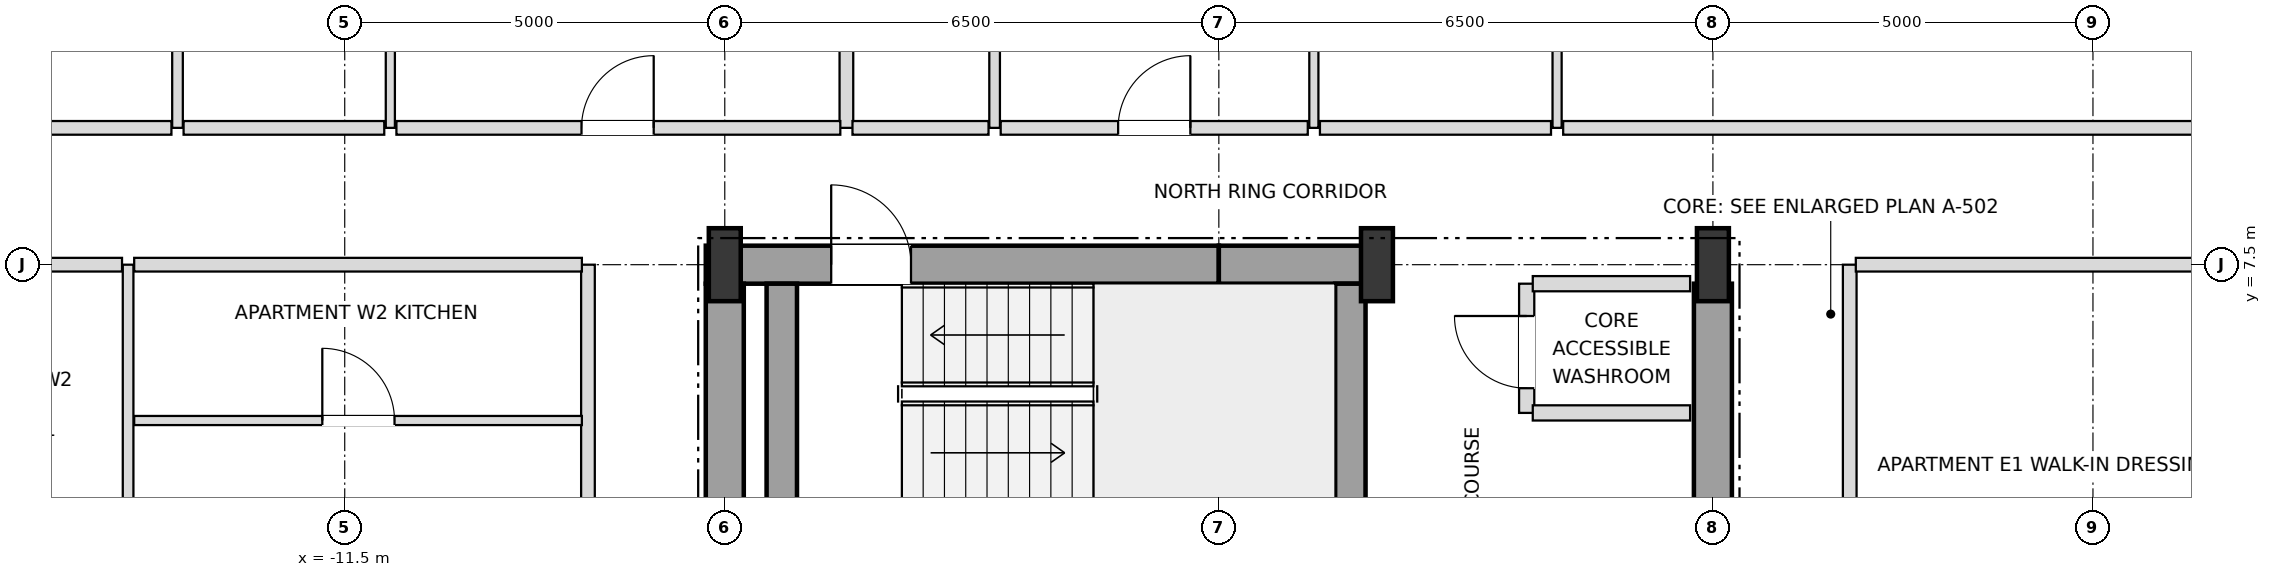
"""IFC4 building model, lengths in metres.
Left out: names, types, materials, properties, quantities, classifications, styles, units other than length and angle.
Written with IfcOpenShell. Run it as: python <this file> out.ifc"""

import sys

from ifc_helpers import new_model, si_unit, direction, frame, frame_2d, origin, origin_2d, place, context, subcontext, project, spatial, rectangle, i_section, extrude, element, fill, save


model = new_model("IFC4")
c1 = context("Model", 3, precision=1e-05, world=origin(), true_north=direction((0.0, 1.0)))
c2 = subcontext(c1, "Body", "Model", "MODEL_VIEW")
j1 = project(units=[si_unit("LENGTHUNIT", "METRE"), si_unit("PLANEANGLEUNIT", "RADIAN")], contexts=[c1])
p1 = place(None, origin())
s1 = spatial("IfcSite", under=j1, at=p1, CompositionType="ELEMENT")
p2 = place(p1, origin())
s2 = spatial("IfcBuilding", under=s1, at=p2, CompositionType="ELEMENT")
p3 = place(p2, frame((0.0, 0.0, 117.0)))
s3 = spatial("IfcBuildingStorey", under=s2, at=p3, CompositionType="ELEMENT", Elevation=117.0)
for number, where, z_axis, x_axis in (
    (1, (-6.5, 7.5, 0.0), (0.0, 0.0, 1.0), (1.0, 0.0, 0.0)),
    (2, (2.08, 7.5, 0.0), (0.0, 0.0, 1.0), (1.0, 0.0, 0.0)),
    (3, (6.5, 7.5, 0.0), (0.0, 0.0, 1.0), (1.0, 0.0, 0.0)),
):
    element("IfcColumn", number, at=place(p3, frame(where, z_axis=z_axis, x_axis=x_axis)), inside=s3, PredefinedType="COLUMN", context=c2, shape_type="SweptSolid", body=[
        extrude(i_section(OverallWidth=0.42, OverallDepth=0.96, WebThickness=0.022, FlangeThickness=0.034, at=origin_2d()), origin(), (0.0, 0.0, 1.0), 3.6),
    ])
p4 = place(p3, frame((-6.75, 7.5, 0.0), z_axis=(0.0, 0.0, 1.0), x_axis=(1.0, 0.0, 0.0)))
e4 = element("IfcWall", 4, at=p4, inside=s3, PredefinedType="SHEAR", context=c2, shape_type="SweptSolid", body=[
    extrude(rectangle(XDim=6.75, YDim=0.5, at=frame_2d((3.375, 0.0))), origin(), (0.0, 0.0, 1.0), 3.3),
])
p5 = place(p4, frame((1.65, 0.0, 0.0)))
e5 = element("IfcOpeningElement", 5, at=p5, cuts=e4, PredefinedType="OPENING", context=c2, shape_type="SweptSolid", body=[
    extrude(rectangle(XDim=1.05, YDim=2.15, at=frame_2d((0.525, 1.075))), frame((0.0, 0.26, 0.0), z_axis=(0.0, -1.0, 0.0), x_axis=(1.0, 0.0, 0.0)), (0.0, 0.0, 1.0), 0.52),
])
p6 = place(p3, frame((0.0, 7.5, 0.0), z_axis=(0.0, 0.0, 1.0), x_axis=(1.0, 0.0, 0.0)))
e6 = element("IfcWall", 6, at=p6, inside=s3, PredefinedType="SHEAR", context=c2, shape_type="SweptSolid", body=[
    extrude(rectangle(XDim=2.08, YDim=0.5, at=frame_2d((1.04, 0.0))), origin(), (0.0, 0.0, 1.0), 3.3),
])
for number, where, z_axis, x_axis in (
    (7, (-6.5, 3.95, 0.0), (0.0, 0.0, 1.0), (0.0, 1.0, 0.0)),
    (8, (6.5, 3.95, 0.0), (0.0, 0.0, 1.0), (0.0, 1.0, 0.0)),
):
    element("IfcWall", number, at=place(p3, frame(where, z_axis=z_axis, x_axis=x_axis)), inside=s3, PredefinedType="SHEAR", context=c2, shape_type="SweptSolid", body=[
        extrude(rectangle(XDim=3.3, YDim=0.5, at=frame_2d((1.65, 0.0))), origin(), (0.0, 0.0, 1.0), 3.3),
    ])
for number, where, z_axis, x_axis in (
    (9, (1.73, 3.95, 0.0), (0.0, 0.0, 1.0), (0.0, 1.0, 0.0)),
    (10, (-5.75, 3.95, 0.0), (0.0, 0.0, 1.0), (0.0, 1.0, 0.0)),
):
    element("IfcWall", number, at=place(p3, frame(where, z_axis=z_axis, x_axis=x_axis)), inside=s3, PredefinedType="SHEAR", context=c2, shape_type="SweptSolid", body=[
        extrude(rectangle(XDim=3.3, YDim=0.4, at=frame_2d((1.65, 0.0))), origin(), (0.0, 0.0, 1.0), 3.3),
    ])
p7 = place(p3, frame((-14.35, -7.5, 0.0), z_axis=(0.0, 0.0, 1.0), x_axis=(0.0, 1.0, 0.0)))
e11 = element("IfcWall", 11, at=p7, inside=s3, PredefinedType="PARTITIONING", context=c2, shape_type="SweptSolid", body=[
    extrude(rectangle(XDim=15.0, YDim=0.14, at=frame_2d((7.5, 0.0))), origin(), (0.0, 0.0, 1.0), 3.3),
])
p8 = place(p7, frame((2.305, 0.0, 0.0)))
e12 = element("IfcOpeningElement", 12, at=p8, cuts=e11, PredefinedType="OPENING", context=c2, shape_type="SweptSolid", body=[
    extrude(rectangle(XDim=0.95, YDim=2.1, at=frame_2d((0.475, 1.05))), frame((0.0, 0.08, 0.0), z_axis=(0.0, -1.0, 0.0), x_axis=(1.0, 0.0, 0.0)), (0.0, 0.0, 1.0), 0.16),
])
p9 = place(p7, frame((9.795, 0.0, 0.0)))
e13 = element("IfcOpeningElement", 13, at=p9, cuts=e11, PredefinedType="OPENING", context=c2, shape_type="SweptSolid", body=[
    extrude(rectangle(XDim=0.95, YDim=2.1, at=frame_2d((0.475, 1.05))), frame((0.0, 0.08, 0.0), z_axis=(0.0, -1.0, 0.0), x_axis=(1.0, 0.0, 0.0)), (0.0, 0.0, 1.0), 0.16),
])
p10 = place(p3, frame((-13.7, 9.3, 0.0), z_axis=(0.0, 0.0, 1.0), x_axis=(0.0, 1.0, 0.0)))
e14 = element("IfcWall", 14, at=p10, inside=s3, PredefinedType="PARTITIONING", context=c2, shape_type="SweptSolid", body=[
    extrude(rectangle(XDim=7.85, YDim=0.14, at=frame_2d((3.925, 0.0))), origin(), (0.0, 0.0, 1.0), 2.656),
])
p11 = place(p10, frame((3.47, 0.0, 0.0)))
e15 = element("IfcOpeningElement", 15, at=p11, cuts=e14, PredefinedType="OPENING", context=c2, shape_type="SweptSolid", body=[
    extrude(rectangle(XDim=0.9, YDim=2.1, at=frame_2d((0.45, 1.05))), frame((0.0, 0.08, 0.0), z_axis=(0.0, -1.0, 0.0), x_axis=(1.0, 0.0, 0.0)), (0.0, 0.0, 1.0), 0.16),
])
p12 = place(p3, frame((-10.9, 9.3, 0.0), z_axis=(0.0, 0.0, 1.0), x_axis=(0.0, 1.0, 0.0)))
e16 = element("IfcWall", 16, at=p12, inside=s3, PredefinedType="PARTITIONING", context=c2, shape_type="SweptSolid", body=[
    extrude(rectangle(XDim=13.85, YDim=0.12, at=frame_2d((6.925, 0.0))), origin(), (0.0, 0.0, 1.0), 2.736),
])
p13 = place(p12, frame((4.219, 0.0, 0.0)))
e17 = element("IfcOpeningElement", 17, at=p13, cuts=e16, PredefinedType="OPENING", context=c2, shape_type="SweptSolid", body=[
    extrude(rectangle(XDim=0.95, YDim=2.1, at=frame_2d((0.475, 1.05))), frame((0.0, 0.07, 0.0), z_axis=(0.0, -1.0, 0.0), x_axis=(1.0, 0.0, 0.0)), (0.0, 0.0, 1.0), 0.14),
])
p14 = place(p12, frame((11.551, 0.0, 0.0)))
e18 = element("IfcOpeningElement", 18, at=p14, cuts=e16, PredefinedType="OPENING", context=c2, shape_type="SweptSolid", body=[
    extrude(rectangle(XDim=0.9, YDim=2.1, at=frame_2d((0.45, 1.05))), frame((0.0, 0.07, 0.0), z_axis=(0.0, -1.0, 0.0), x_axis=(1.0, 0.0, 0.0)), (0.0, 0.0, 1.0), 0.14),
])
p15 = place(p3, frame((-8.3, -7.5, 0.0), z_axis=(0.0, 0.0, 1.0), x_axis=(0.0, 1.0, 0.0)))
e19 = element("IfcWall", 19, at=p15, inside=s3, PredefinedType="PARTITIONING", context=c2, shape_type="SweptSolid", body=[
    extrude(rectangle(XDim=15.0, YDim=0.18, at=frame_2d((7.5, 0.0))), origin(), (0.0, 0.0, 1.0), 3.3),
])
p16 = place(p15, frame((3.145, 0.0, 0.0)))
e20 = element("IfcOpeningElement", 20, at=p16, cuts=e19, PredefinedType="OPENING", context=c2, shape_type="SweptSolid", body=[
    extrude(rectangle(XDim=0.95, YDim=2.15, at=frame_2d((0.475, 1.075))), frame((0.0, 0.1, 0.0), z_axis=(0.0, -1.0, 0.0), x_axis=(1.0, 0.0, 0.0)), (0.0, 0.0, 1.0), 0.2),
])
p17 = place(p15, frame((10.645, 0.0, 0.0)))
e21 = element("IfcOpeningElement", 21, at=p17, cuts=e19, PredefinedType="OPENING", context=c2, shape_type="SweptSolid", body=[
    extrude(rectangle(XDim=0.95, YDim=2.15, at=frame_2d((0.475, 1.075))), frame((0.0, 0.1, 0.0), z_axis=(0.0, -1.0, 0.0), x_axis=(1.0, 0.0, 0.0)), (0.0, 0.0, 1.0), 0.2),
])
p18 = place(p3, frame((-4.9, 9.3, 0.0), z_axis=(0.0, 0.0, 1.0), x_axis=(0.0, 1.0, 0.0)))
e22 = element("IfcWall", 22, at=p18, inside=s3, PredefinedType="PARTITIONING", context=c2, shape_type="SweptSolid", body=[
    extrude(rectangle(XDim=13.85, YDim=0.18, at=frame_2d((6.925, 0.0))), origin(), (0.0, 0.0, 1.0), 2.736),
])
p19 = place(p3, frame((-2.95, 9.3, 0.0), z_axis=(0.0, 0.0, 1.0), x_axis=(0.0, 1.0, 0.0)))
e23 = element("IfcWall", 23, at=p19, inside=s3, PredefinedType="PARTITIONING", context=c2, shape_type="SweptSolid", body=[
    extrude(rectangle(XDim=7.85, YDim=0.14, at=frame_2d((3.925, 0.0))), origin(), (0.0, 0.0, 1.0), 3.3),
])
p20 = place(p19, frame((3.47, 0.0, 0.0)))
e24 = element("IfcOpeningElement", 24, at=p20, cuts=e23, PredefinedType="OPENING", context=c2, shape_type="SweptSolid", body=[
    extrude(rectangle(XDim=0.9, YDim=2.1, at=frame_2d((0.45, 1.05))), frame((0.0, 0.08, 0.0), z_axis=(0.0, -1.0, 0.0), x_axis=(1.0, 0.0, 0.0)), (0.0, 0.0, 1.0), 0.16),
])
p21 = place(p3, frame((1.25, 9.3, 0.0), z_axis=(0.0, 0.0, 1.0), x_axis=(0.0, 1.0, 0.0)))
e25 = element("IfcWall", 25, at=p21, inside=s3, PredefinedType="PARTITIONING", context=c2, shape_type="SweptSolid", body=[
    extrude(rectangle(XDim=7.85, YDim=0.12, at=frame_2d((3.925, 0.0))), origin(), (0.0, 0.0, 1.0), 3.3),
])
p22 = place(p21, frame((3.445, 0.0, 0.0)))
e26 = element("IfcOpeningElement", 26, at=p22, cuts=e25, PredefinedType="OPENING", context=c2, shape_type="SweptSolid", body=[
    extrude(rectangle(XDim=0.95, YDim=2.1, at=frame_2d((0.475, 1.05))), frame((0.0, 0.07, 0.0), z_axis=(0.0, -1.0, 0.0), x_axis=(1.0, 0.0, 0.0)), (0.0, 0.0, 1.0), 0.14),
])
p23 = place(p3, frame((4.05, 5.55, 0.0), z_axis=(0.0, 0.0, 1.0), x_axis=(0.0, 1.0, 0.0)))
e27 = element("IfcWall", 27, at=p23, inside=s3, PredefinedType="SOLIDWALL", context=c2, shape_type="SweptSolid", body=[
    extrude(rectangle(XDim=1.7, YDim=0.2, at=frame_2d((0.85, 0.0))), origin(), (0.0, 0.0, 1.0), 3.3),
])
p24 = place(p23, frame((0.325, 0.0, 0.0)))
e28 = element("IfcOpeningElement", 28, at=p24, cuts=e27, PredefinedType="OPENING", context=c2, shape_type="SweptSolid", body=[
    extrude(rectangle(XDim=0.95, YDim=2.15, at=frame_2d((0.475, 1.075))), frame((0.0, 0.11, 0.0), z_axis=(0.0, -1.0, 0.0), x_axis=(1.0, 0.0, 0.0)), (0.0, 0.0, 1.0), 0.22),
])
p25 = place(p3, frame((4.45, 9.3, 0.0), z_axis=(0.0, 0.0, 1.0), x_axis=(0.0, 1.0, 0.0)))
e29 = element("IfcWall", 29, at=p25, inside=s3, PredefinedType="PARTITIONING", context=c2, shape_type="SweptSolid", body=[
    extrude(rectangle(XDim=13.85, YDim=0.12, at=frame_2d((6.925, 0.0))), origin(), (0.0, 0.0, 1.0), 2.736),
])
p26 = place(p25, frame((3.445, 0.0, 0.0)))
e30 = element("IfcOpeningElement", 30, at=p26, cuts=e29, PredefinedType="OPENING", context=c2, shape_type="SweptSolid", body=[
    extrude(rectangle(XDim=0.95, YDim=2.1, at=frame_2d((0.475, 1.05))), frame((0.0, 0.07, 0.0), z_axis=(0.0, -1.0, 0.0), x_axis=(1.0, 0.0, 0.0)), (0.0, 0.0, 1.0), 0.14),
])
p27 = place(p25, frame((10.4, 0.0, 0.0)))
e31 = element("IfcOpeningElement", 31, at=p27, cuts=e29, PredefinedType="OPENING", context=c2, shape_type="SweptSolid", body=[
    extrude(rectangle(XDim=0.9, YDim=2.1, at=frame_2d((0.45, 1.05))), frame((0.0, 0.07, 0.0), z_axis=(0.0, -1.0, 0.0), x_axis=(1.0, 0.0, 0.0)), (0.0, 0.0, 1.0), 0.14),
])
p28 = place(p3, frame((8.3, -7.5, 0.0), z_axis=(0.0, 0.0, 1.0), x_axis=(0.0, 1.0, 0.0)))
e32 = element("IfcWall", 32, at=p28, inside=s3, PredefinedType="PARTITIONING", context=c2, shape_type="SweptSolid", body=[
    extrude(rectangle(XDim=15.0, YDim=0.18, at=frame_2d((7.5, 0.0))), origin(), (0.0, 0.0, 1.0), 3.3),
])
p29 = place(p28, frame((3.475, 0.0, 0.0)))
e33 = element("IfcOpeningElement", 33, at=p29, cuts=e32, PredefinedType="OPENING", context=c2, shape_type="SweptSolid", body=[
    extrude(rectangle(XDim=0.95, YDim=2.15, at=frame_2d((0.475, 1.075))), frame((0.0, 0.1, 0.0), z_axis=(0.0, -1.0, 0.0), x_axis=(1.0, 0.0, 0.0)), (0.0, 0.0, 1.0), 0.2),
])
p30 = place(p3, frame((-14.27, 5.45, 0.0), z_axis=(0.0, 0.0, 1.0), x_axis=(1.0, 0.0, 0.0)))
e34 = element("IfcWall", 34, at=p30, inside=s3, PredefinedType="PARTITIONING", context=c2, shape_type="SweptSolid", body=[
    extrude(rectangle(XDim=5.89, YDim=0.12, at=frame_2d((2.945, 0.0))), origin(), (0.0, 0.0, 1.0), 3.3),
])
p31 = place(p30, frame((2.475, 0.0, 0.0)))
e35 = element("IfcOpeningElement", 35, at=p31, cuts=e34, PredefinedType="OPENING", context=c2, shape_type="SweptSolid", body=[
    extrude(rectangle(XDim=0.95, YDim=2.1, at=frame_2d((0.475, 1.05))), frame((0.0, 0.07, 0.0), z_axis=(0.0, -1.0, 0.0), x_axis=(1.0, 0.0, 0.0)), (0.0, 0.0, 1.0), 0.14),
])
for number, where, z_axis, x_axis in (
    (36, (4.13, 5.55, 0.0), (0.0, 0.0, 1.0), (1.0, 0.0, 0.0)),
    (37, (4.13, 7.25, 0.0), (0.0, 0.0, 1.0), (1.0, 0.0, 0.0)),
):
    element("IfcWall", number, at=place(p3, frame(where, z_axis=z_axis, x_axis=x_axis)), inside=s3, PredefinedType="SOLIDWALL", context=c2, shape_type="SweptSolid", body=[
        extrude(rectangle(XDim=2.07, YDim=0.2, at=frame_2d((1.035, 0.0))), origin(), (0.0, 0.0, 1.0), 3.3),
    ])
p32 = place(p3, frame((-20.15, 7.5, 0.0), z_axis=(0.0, 0.0, 1.0), x_axis=(1.0, 0.0, 0.0)))
e38 = element("IfcWall", 38, at=p32, inside=s3, PredefinedType="PARTITIONING", context=c2, shape_type="SweptSolid", body=[
    extrude(rectangle(XDim=5.72, YDim=0.18, at=frame_2d((2.86, 0.0))), origin(), (0.0, 0.0, 1.0), 2.736),
])
for number, where, z_axis, x_axis in (
    (39, (-14.27, 7.5, 0.0), (0.0, 0.0, 1.0), (1.0, 0.0, 0.0)),
    (40, (8.38, 7.5, 0.0), (0.0, 0.0, 1.0), (1.0, 0.0, 0.0)),
):
    element("IfcWall", number, at=place(p3, frame(where, z_axis=z_axis, x_axis=x_axis)), inside=s3, PredefinedType="PARTITIONING", context=c2, shape_type="SweptSolid", body=[
        extrude(rectangle(XDim=5.89, YDim=0.18, at=frame_2d((2.945, 0.0))), origin(), (0.0, 0.0, 1.0), 2.736),
    ])
p33 = place(p3, frame((-15.57, 9.3, 0.0), z_axis=(0.0, 0.0, 1.0), x_axis=(1.0, 0.0, 0.0)))
e41 = element("IfcWall", 41, at=p33, inside=s3, PredefinedType="PARTITIONING", context=c2, shape_type="SweptSolid", body=[
    extrude(rectangle(XDim=1.79, YDim=0.18, at=frame_2d((0.895, 0.0))), origin(), (0.0, 0.0, 1.0), 3.3),
])
p34 = place(p3, frame((-13.62, 9.3, 0.0), z_axis=(0.0, 0.0, 1.0), x_axis=(1.0, 0.0, 0.0)))
e42 = element("IfcWall", 42, at=p34, inside=s3, PredefinedType="PARTITIONING", context=c2, shape_type="SweptSolid", body=[
    extrude(rectangle(XDim=2.64, YDim=0.18, at=frame_2d((1.32, 0.0))), origin(), (0.0, 0.0, 1.0), 3.3),
])
p35 = place(p3, frame((-10.82, 9.3, 0.0), z_axis=(0.0, 0.0, 1.0), x_axis=(1.0, 0.0, 0.0)))
e43 = element("IfcWall", 43, at=p35, inside=s3, PredefinedType="PARTITIONING", context=c2, shape_type="SweptSolid", body=[
    extrude(rectangle(XDim=5.84, YDim=0.18, at=frame_2d((2.92, 0.0))), origin(), (0.0, 0.0, 1.0), 2.736),
])
p36 = place(p35, frame((2.435, 0.0, 0.0)))
e44 = element("IfcOpeningElement", 44, at=p36, cuts=e43, PredefinedType="OPENING", context=c2, shape_type="SweptSolid", body=[
    extrude(rectangle(XDim=0.95, YDim=2.15, at=frame_2d((0.475, 1.075))), frame((0.0, 0.1, 0.0), z_axis=(0.0, -1.0, 0.0), x_axis=(1.0, 0.0, 0.0)), (0.0, 0.0, 1.0), 0.2),
])
p37 = place(p3, frame((-4.82, 9.3, 0.0), z_axis=(0.0, 0.0, 1.0), x_axis=(1.0, 0.0, 0.0)))
e45 = element("IfcWall", 45, at=p37, inside=s3, PredefinedType="PARTITIONING", context=c2, shape_type="SweptSolid", body=[
    extrude(rectangle(XDim=1.79, YDim=0.18, at=frame_2d((0.895, 0.0))), origin(), (0.0, 0.0, 1.0), 3.3),
])
p38 = place(p3, frame((-2.87, 9.3, 0.0), z_axis=(0.0, 0.0, 1.0), x_axis=(1.0, 0.0, 0.0)))
e46 = element("IfcWall", 46, at=p38, inside=s3, PredefinedType="PARTITIONING", context=c2, shape_type="SweptSolid", body=[
    extrude(rectangle(XDim=4.04, YDim=0.18, at=frame_2d((2.02, 0.0))), origin(), (0.0, 0.0, 1.0), 3.3),
])
p39 = place(p38, frame((1.545, 0.0, 0.0)))
e47 = element("IfcOpeningElement", 47, at=p39, cuts=e46, PredefinedType="OPENING", context=c2, shape_type="SweptSolid", body=[
    extrude(rectangle(XDim=0.95, YDim=2.15, at=frame_2d((0.475, 1.075))), frame((0.0, 0.1, 0.0), z_axis=(0.0, -1.0, 0.0), x_axis=(1.0, 0.0, 0.0)), (0.0, 0.0, 1.0), 0.2),
])
p40 = place(p3, frame((1.33, 9.3, 0.0), z_axis=(0.0, 0.0, 1.0), x_axis=(1.0, 0.0, 0.0)))
e48 = element("IfcWall", 48, at=p40, inside=s3, PredefinedType="PARTITIONING", context=c2, shape_type="SweptSolid", body=[
    extrude(rectangle(XDim=3.04, YDim=0.18, at=frame_2d((1.52, 0.0))), origin(), (0.0, 0.0, 1.0), 3.3),
])
p41 = place(p3, frame((4.53, 9.3, 0.0), z_axis=(0.0, 0.0, 1.0), x_axis=(1.0, 0.0, 0.0)))
e49 = element("IfcWall", 49, at=p41, inside=s3, PredefinedType="PARTITIONING", context=c2, shape_type="SweptSolid", body=[
    extrude(rectangle(XDim=11.04, YDim=0.18, at=frame_2d((5.52, 0.0))), origin(), (0.0, 0.0, 1.0), 2.736),
])
p42 = place(p5, origin())
e50 = element("IfcDoor", 50, at=p42, inside=s3, OperationType="SINGLE_SWING_LEFT", PredefinedType="DOOR", context=c2, shape_type="SweptSolid", body=[
    extrude(rectangle(XDim=1.05, YDim=2.15, at=frame_2d((0.525, 1.075))), frame((0.0, 0.025, 0.0), z_axis=(0.0, -1.0, 0.0), x_axis=(1.0, 0.0, 0.0)), (0.0, 0.0, 1.0), 0.05),
])
fill(e5, e50)
p43 = place(p24, origin())
e51 = element("IfcDoor", 51, at=p43, inside=s3, OperationType="SINGLE_SWING_RIGHT", PredefinedType="DOOR", context=c2, shape_type="SweptSolid", body=[
    extrude(rectangle(XDim=0.95, YDim=2.15, at=frame_2d((0.475, 1.075))), frame((0.0, 0.025, 0.0), z_axis=(0.0, -1.0, 0.0), x_axis=(1.0, 0.0, 0.0)), (0.0, 0.0, 1.0), 0.05),
])
fill(e28, e51)
p44 = place(p36, origin())
e52 = element("IfcDoor", 52, at=p44, inside=s3, OperationType="SINGLE_SWING_RIGHT", PredefinedType="DOOR", context=c2, shape_type="SweptSolid", body=[
    extrude(rectangle(XDim=0.95, YDim=2.15, at=frame_2d((0.475, 1.075))), frame((0.0, 0.025, 0.0), z_axis=(0.0, -1.0, 0.0), x_axis=(1.0, 0.0, 0.0)), (0.0, 0.0, 1.0), 0.05),
])
fill(e44, e52)
p45 = place(p39, origin())
e53 = element("IfcDoor", 53, at=p45, inside=s3, OperationType="SINGLE_SWING_RIGHT", PredefinedType="DOOR", context=c2, shape_type="SweptSolid", body=[
    extrude(rectangle(XDim=0.95, YDim=2.15, at=frame_2d((0.475, 1.075))), frame((0.0, 0.025, 0.0), z_axis=(0.0, -1.0, 0.0), x_axis=(1.0, 0.0, 0.0)), (0.0, 0.0, 1.0), 0.05),
])
fill(e47, e53)
p46 = place(p31, origin())
e54 = element("IfcDoor", 54, at=p46, inside=s3, OperationType="SINGLE_SWING_LEFT", PredefinedType="DOOR", context=c2, shape_type="SweptSolid", body=[
    extrude(rectangle(XDim=0.95, YDim=2.1, at=frame_2d((0.475, 1.05))), frame((0.0, 0.025, 0.0), z_axis=(0.0, -1.0, 0.0), x_axis=(1.0, 0.0, 0.0)), (0.0, 0.0, 1.0), 0.05),
])
fill(e35, e54)
save(model, sys.argv[1])
